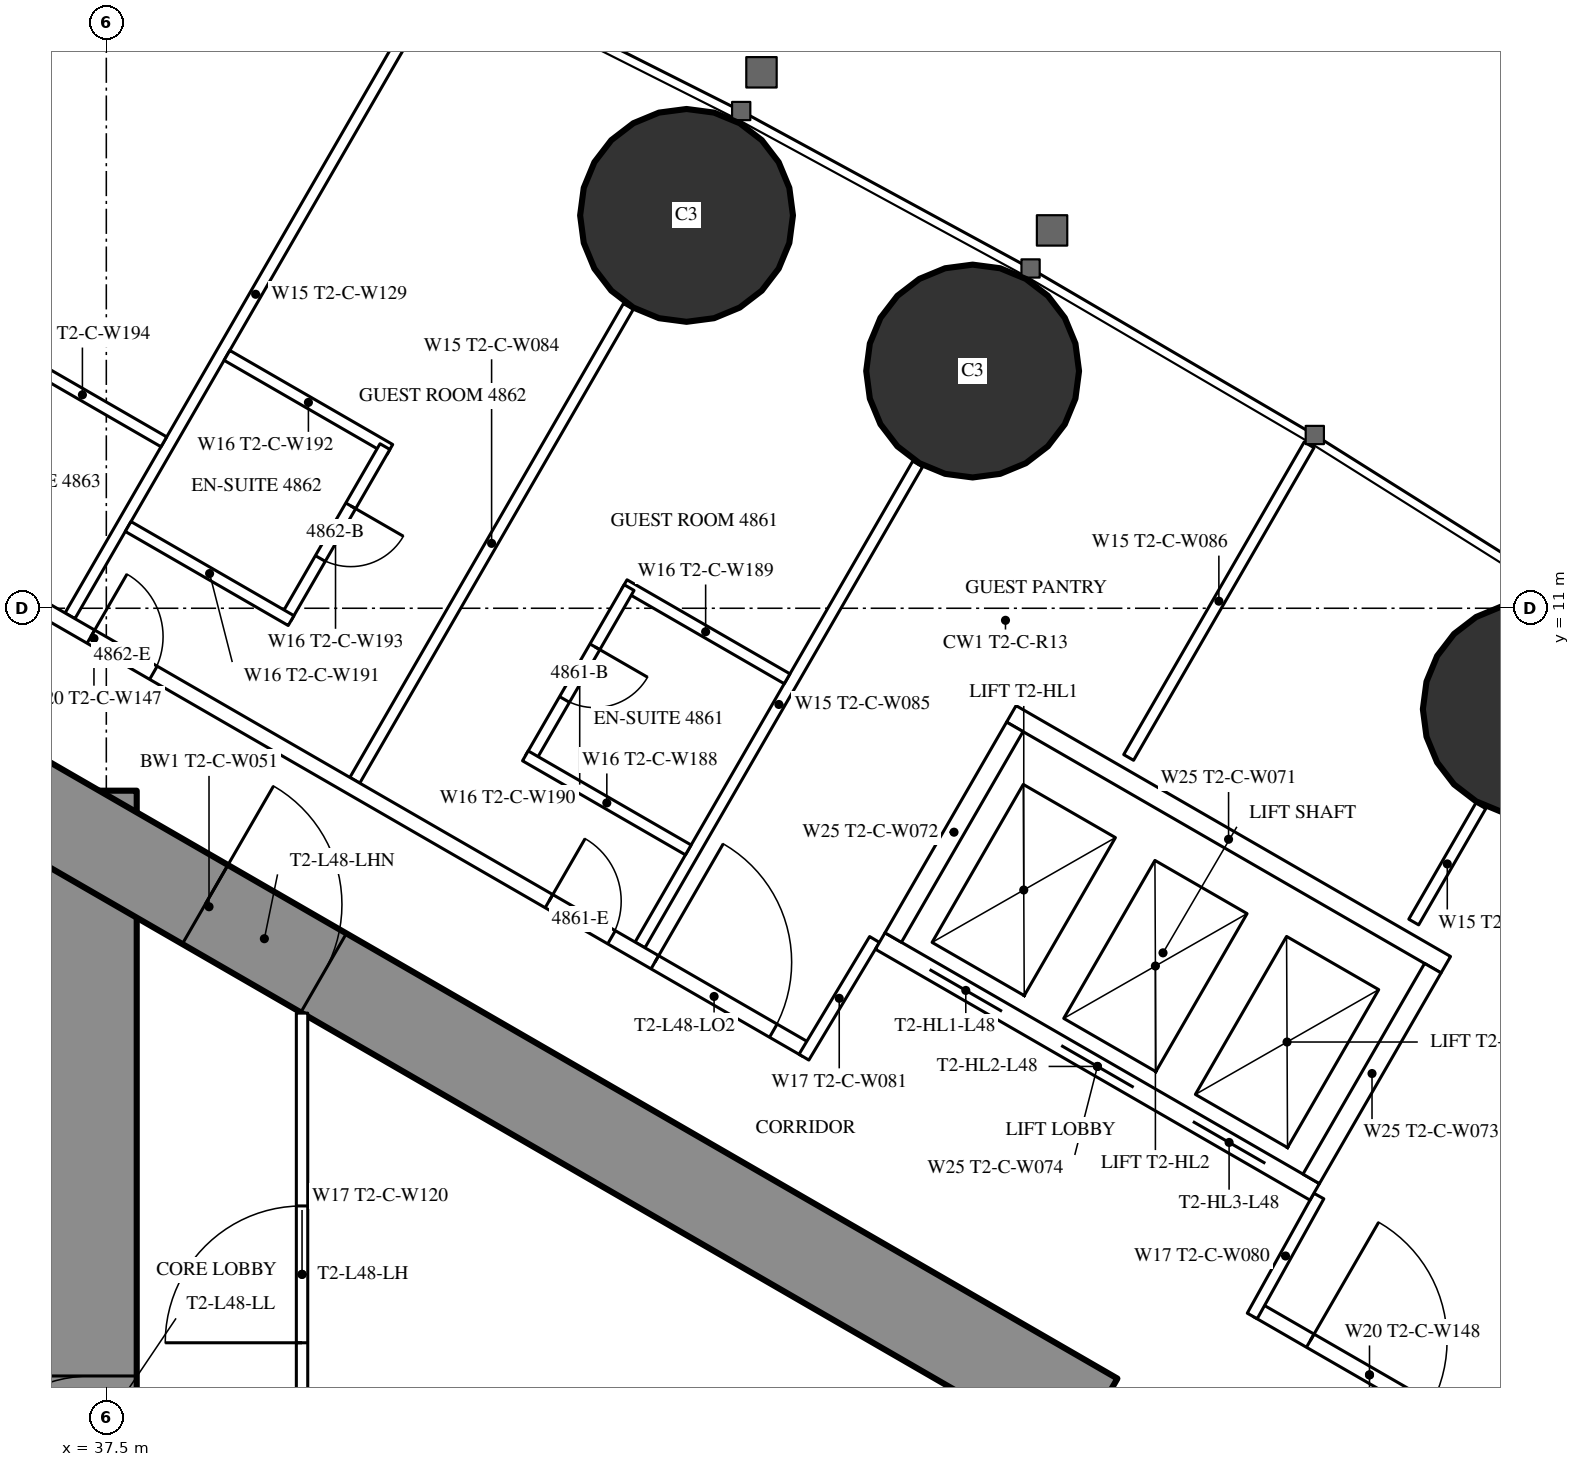
"""IFC4 building model, lengths in metres.
Left out: names, types, materials, properties, quantities, classifications, styles, units other than length and angle.
Written with IfcOpenShell. Run it as: python <this file> out.ifc"""

import sys

from ifc_helpers import new_model, si_unit, direction, frame, frame_2d, origin, origin_2d, place, context, subcontext, project, spatial, rectangle, circle, extrude, element, fill, save


model = new_model("IFC4")
c1 = context("Model", 3, precision=1e-05, world=origin(), true_north=direction((0.0, 1.0)))
c2 = subcontext(c1, "Body", "Model", "MODEL_VIEW")
j1 = project(units=[si_unit("LENGTHUNIT", "METRE"), si_unit("PLANEANGLEUNIT", "RADIAN")], contexts=[c1])
p1 = place(None, origin())
s1 = spatial("IfcSite", under=j1, at=p1, CompositionType="ELEMENT")
p2 = place(p1, origin())
s2 = spatial("IfcBuilding", under=s1, at=p2, CompositionType="ELEMENT")
p3 = place(p2, frame((0.0, 0.0, 180.8)))
s3 = spatial("IfcBuildingStorey", under=s2, at=p3, CompositionType="ELEMENT", Elevation=180.8)
for number, where, z_axis, x_axis in (
    (1, (56.221, 9.672, 0.0), (0.0, 0.0, 1.0), (1.0, 0.0, 0.0)),
    (2, (48.897, 14.121, 0.0), (0.0, 0.0, 1.0), (1.0, 0.0, 0.0)),
    (3, (45.134, 16.168, 0.0), (0.0, 0.0, 1.0), (1.0, 0.0, 0.0)),
):
    element("IfcColumn", number, at=place(p3, frame(where, z_axis=z_axis, x_axis=x_axis)), inside=s3, PredefinedType="COLUMN", context=c2, shape_type="SweptSolid", body=[
        extrude(circle(Radius=1.4, at=origin_2d()), origin(), (0.0, 0.0, 1.0), 3.5),
    ])
p4 = place(p3, frame((37.3, -8.6, 0.0), z_axis=(0.0, 0.0, 1.0), x_axis=(0.0, 1.0, 0.0)))
e4 = element("IfcWall", 4, at=p4, inside=s3, PredefinedType="SHEAR", context=c2, shape_type="SweptSolid", body=[
    extrude(rectangle(XDim=17.2, YDim=1.2, at=frame_2d((8.6, 0.0))), origin(), (0.0, 0.0, 1.0), 3.5),
])
p5 = place(p4, frame((7.7, 0.0, 0.0)))
e5 = element("IfcOpeningElement", 5, at=p5, cuts=e4, PredefinedType="OPENING", context=c2, shape_type="SweptSolid", body=[
    extrude(rectangle(XDim=1.8, YDim=2.2, at=frame_2d((0.9, 1.1))), frame((0.0, 0.61, 0.0), z_axis=(0.0, -1.0, 0.0), x_axis=(1.0, 0.0, 0.0)), (0.0, 0.0, 1.0), 1.22),
])
p6 = place(p3, frame((27.2, 13.8, 0.0), z_axis=(0.0, 0.0, 1.0), x_axis=(0.866024515034, -0.500001539357, 0.0)))
e6 = element("IfcWall", 6, at=p6, inside=s3, PredefinedType="SHEAR", context=c2, shape_type="SweptSolid", body=[
    extrude(rectangle(XDim=26.907, YDim=1.2, at=frame_2d((13.454, 0.0))), origin(), (0.0, 0.0, 1.0), 3.5),
])
p7 = place(p6, frame((4.6, 0.0, 0.0)))
e7 = element("IfcOpeningElement", 7, at=p7, cuts=e6, PredefinedType="OPENING", context=c2, shape_type="SweptSolid", body=[
    extrude(rectangle(XDim=1.0, YDim=2.2, at=frame_2d((0.5, 1.1))), frame((0.0, 0.61, 0.0), z_axis=(0.0, -1.0, 0.0), x_axis=(1.0, 0.0, 0.0)), (0.0, 0.0, 1.0), 1.22),
])
p8 = place(p6, frame((13.395, 0.0, 0.0)))
e8 = element("IfcOpeningElement", 8, at=p8, cuts=e6, PredefinedType="OPENING", context=c2, shape_type="SweptSolid", body=[
    extrude(rectangle(XDim=1.8, YDim=2.2, at=frame_2d((0.9, 1.1))), frame((0.0, 0.61, 0.0), z_axis=(0.0, -1.0, 0.0), x_axis=(1.0, 0.0, 0.0)), (0.0, 0.0, 1.0), 1.22),
])
p9 = place(p3, frame((37.022, 10.9, 0.0), z_axis=(0.0, 0.0, 1.0), x_axis=(0.499998620953, 0.866026199976, 0.0)))
e9 = element("IfcWall", 9, at=p9, inside=s3, PredefinedType="PARTITIONING", context=c2, shape_type="SweptSolid", body=[
    extrude(rectangle(XDim=9.77, YDim=0.15, at=frame_2d((4.885, 0.0))), origin(), (0.0, 0.0, 1.0), 3.25),
])
p10 = place(p3, frame((40.769, 8.737, 0.0), z_axis=(0.0, 0.0, 1.0), x_axis=(0.500013115284, 0.866017831539, 0.0)))
e10 = element("IfcWall", 10, at=p10, inside=s3, PredefinedType="PARTITIONING", context=c2, shape_type="SweptSolid", body=[
    extrude(rectangle(XDim=7.198, YDim=0.15, at=frame_2d((3.599, 0.0))), origin(), (0.0, 0.0, 1.0), 2.3),
])
p11 = place(p3, frame((44.521, 6.571, 0.0), z_axis=(0.0, 0.0, 1.0), x_axis=(0.500020376429, 0.866013639128, 0.0)))
e11 = element("IfcWall", 11, at=p11, inside=s3, PredefinedType="PARTITIONING", context=c2, shape_type="SweptSolid", body=[
    extrude(rectangle(XDim=7.306, YDim=0.15, at=frame_2d((3.653, 0.0))), origin(), (0.0, 0.0, 1.0), 2.3),
])
p12 = place(p3, frame((50.95, 9.037, 0.0), z_axis=(0.0, 0.0, 1.0), x_axis=(0.499988022762, 0.866032318735, 0.0)))
e12 = element("IfcWall", 12, at=p12, inside=s3, PredefinedType="PARTITIONING", context=c2, shape_type="SweptSolid", body=[
    extrude(rectangle(XDim=4.748, YDim=0.15, at=frame_2d((2.374, 0.0))), origin(), (0.0, 0.0, 1.0), 3.25),
])
p13 = place(p3, frame((54.7, 6.872, 0.0), z_axis=(0.0, 0.0, 1.0), x_axis=(0.499989690894, 0.866031355668, 0.0)))
e13 = element("IfcWall", 13, at=p13, inside=s3, PredefinedType="PARTITIONING", context=c2, shape_type="SweptSolid", body=[
    extrude(rectangle(XDim=1.766, YDim=0.15, at=frame_2d((0.883, 0.0))), origin(), (0.0, 0.0, 1.0), 3.25),
])
p14 = place(p3, frame((27.959, 16.017, 0.0), z_axis=(0.0, 0.0, 1.0), x_axis=(0.866027146794, -0.499996981007, 0.0)))
e14 = element("IfcWall", 14, at=p14, inside=s3, PredefinedType="PARTITIONING", context=c2, shape_type="SweptSolid", body=[
    extrude(rectangle(XDim=21.657, YDim=0.2, at=frame_2d((10.829, 0.0))), origin(), (0.0, 0.0, 1.0), 3.25),
])
p15 = place(p14, frame((17.741, 0.0, 0.0)))
e15 = element("IfcOpeningElement", 15, at=p15, cuts=e14, PredefinedType="OPENING", context=c2, shape_type="SweptSolid", body=[
    extrude(rectangle(XDim=0.95, YDim=2.2, at=frame_2d((0.475, 1.1))), frame((0.0, 0.11, 0.0), z_axis=(0.0, -1.0, 0.0), x_axis=(1.0, 0.0, 0.0)), (0.0, 0.0, 1.0), 0.22),
])
p16 = place(p14, frame((10.782, 0.0, 0.0)))
e16 = element("IfcOpeningElement", 16, at=p16, cuts=e14, PredefinedType="OPENING", context=c2, shape_type="SweptSolid", body=[
    extrude(rectangle(XDim=0.95, YDim=2.2, at=frame_2d((0.475, 1.1))), frame((0.0, 0.11, 0.0), z_axis=(0.0, -1.0, 0.0), x_axis=(1.0, 0.0, 0.0)), (0.0, 0.0, 1.0), 0.22),
])
p17 = place(p14, frame((6.732, 0.0, 0.0)))
e17 = element("IfcOpeningElement", 17, at=p17, cuts=e14, PredefinedType="OPENING", context=c2, shape_type="SweptSolid", body=[
    extrude(rectangle(XDim=0.95, YDim=2.2, at=frame_2d((0.475, 1.1))), frame((0.0, 0.11, 0.0), z_axis=(0.0, -1.0, 0.0), x_axis=(1.0, 0.0, 0.0)), (0.0, 0.0, 1.0), 0.22),
])
p18 = place(p14, frame((19.349, 0.0, 0.0)))
e18 = element("IfcOpeningElement", 18, at=p18, cuts=e14, PredefinedType="OPENING", context=c2, shape_type="SweptSolid", body=[
    extrude(rectangle(XDim=1.8, YDim=2.2, at=frame_2d((0.9, 1.1))), frame((0.0, 0.11, 0.0), z_axis=(0.0, -1.0, 0.0), x_axis=(1.0, 0.0, 0.0)), (0.0, 0.0, 1.0), 0.22),
])
p19 = place(p3, frame((52.639, 1.769, 0.0), z_axis=(0.0, 0.0, 1.0), x_axis=(0.866027340901, -0.4999966448, 0.0)))
e19 = element("IfcWall", 19, at=p19, inside=s3, PredefinedType="PARTITIONING", context=c2, shape_type="SweptSolid", body=[
    extrude(rectangle(XDim=3.417, YDim=0.2, at=frame_2d((1.708, 0.0))), origin(), (0.0, 0.0, 1.0), 3.25),
])
p20 = place(p19, frame((0.809, 0.0, 0.0)))
e20 = element("IfcOpeningElement", 20, at=p20, cuts=e19, PredefinedType="OPENING", context=c2, shape_type="SweptSolid", body=[
    extrude(rectangle(XDim=1.8, YDim=2.2, at=frame_2d((0.9, 1.1))), frame((0.0, 0.11, 0.0), z_axis=(0.0, -1.0, 0.0), x_axis=(1.0, 0.0, 0.0)), (0.0, 0.0, 1.0), 0.22),
])
for number, where, z_axis, x_axis in (
    (21, (52.576, 1.689, 0.0), (0.0, 0.0, 1.0), (0.485, 0.874, 0.0)),
    (22, (47.606, 6.643, 0.0), (0.0, 0.0, 1.0), (-0.514, -0.858, 0.0)),
):
    element("IfcWall", number, at=place(p3, frame(where, z_axis=z_axis, x_axis=x_axis)), inside=s3, PredefinedType="PARTITIONING", context=c2, shape_type="SweptSolid", body=[
        extrude(rectangle(XDim=1.805, YDim=0.15, at=frame_2d((0.902, 0.0))), origin(), (0.0, 0.0, 1.0), 3.25),
    ])
p21 = place(p3, frame((44.313, 11.31, 0.0), z_axis=(0.0, 0.0, 1.0), x_axis=(0.866031185235, -0.4999899861, 0.0)))
e23 = element("IfcWall", 23, at=p21, inside=s3, PredefinedType="PARTITIONING", context=c2, shape_type="SweptSolid", body=[
    extrude(rectangle(XDim=2.475, YDim=0.15, at=frame_2d((1.238, 0.0))), origin(), (0.0, 0.0, 1.0), 3.25),
])
p22 = place(p3, frame((43.078, 9.021, 0.0), z_axis=(0.0, 0.0, 1.0), x_axis=(0.49997716683, 0.86603858612, 0.0)))
e24 = element("IfcWall", 24, at=p22, inside=s3, PredefinedType="PARTITIONING", context=c2, shape_type="SweptSolid", body=[
    extrude(rectangle(XDim=2.6, YDim=0.15, at=frame_2d((1.3, 0.0))), origin(), (0.0, 0.0, 1.0), 3.25),
])
p23 = place(p22, frame((0.9, 0.0, 0.0)))
e25 = element("IfcOpeningElement", 25, at=p23, cuts=e24, PredefinedType="OPENING", context=c2, shape_type="SweptSolid", body=[
    extrude(rectangle(XDim=0.8, YDim=2.2, at=frame_2d((0.4, 1.1))), frame((0.0, 0.085, 0.0), z_axis=(0.0, -1.0, 0.0), x_axis=(1.0, 0.0, 0.0)), (0.0, 0.0, 1.0), 0.17),
])
p24 = place(p3, frame((43.013, 9.058, 0.0), z_axis=(0.0, 0.0, 1.0), x_axis=(0.866006523861, -0.500032699561, 0.0)))
e26 = element("IfcWall", 26, at=p24, inside=s3, PredefinedType="PARTITIONING", context=c2, shape_type="SweptSolid", body=[
    extrude(rectangle(XDim=2.475, YDim=0.15, at=frame_2d((1.237, 0.0))), origin(), (0.0, 0.0, 1.0), 2.45),
])
p25 = place(p3, frame((39.087, 14.327, 0.0), z_axis=(0.0, 0.0, 1.0), x_axis=(0.866006523861, -0.500032699561, 0.0)))
e27 = element("IfcWall", 27, at=p25, inside=s3, PredefinedType="PARTITIONING", context=c2, shape_type="SweptSolid", body=[
    extrude(rectangle(XDim=2.475, YDim=0.15, at=frame_2d((1.237, 0.0))), origin(), (0.0, 0.0, 1.0), 3.25),
])
p26 = place(p3, frame((39.865, 10.875, 0.0), z_axis=(0.0, 0.0, 1.0), x_axis=(0.500047596559, 0.865997922154, 0.0)))
e28 = element("IfcWall", 28, at=p26, inside=s3, PredefinedType="PARTITIONING", context=c2, shape_type="SweptSolid", body=[
    extrude(rectangle(XDim=2.6, YDim=0.15, at=frame_2d((1.3, 0.0))), origin(), (0.0, 0.0, 1.0), 3.25),
])
p27 = place(p26, frame((0.9, 0.0, 0.0)))
e29 = element("IfcOpeningElement", 29, at=p27, cuts=e28, PredefinedType="OPENING", context=c2, shape_type="SweptSolid", body=[
    extrude(rectangle(XDim=0.8, YDim=2.2, at=frame_2d((0.4, 1.1))), frame((0.0, 0.085, 0.0), z_axis=(0.0, -1.0, 0.0), x_axis=(1.0, 0.0, 0.0)), (0.0, 0.0, 1.0), 0.17),
])
for number, where, z_axis, x_axis in (
    (30, (37.787, 12.075, 0.0), (0.0, 0.0, 1.0), (0.866, -0.5, 0.0)),
    (31, (36.114, 14.427, 0.0), (0.0, 0.0, 1.0), (0.866, -0.5, 0.0)),
):
    element("IfcWall", number, at=place(p3, frame(where, z_axis=z_axis, x_axis=x_axis)), inside=s3, PredefinedType="PARTITIONING", context=c2, shape_type="SweptSolid", body=[
        extrude(rectangle(XDim=2.475, YDim=0.15, at=frame_2d((1.237, 0.0))), origin(), (0.0, 0.0, 1.0), 3.25),
    ])
p28 = place(p3, frame((40.075, -1.2, 0.0), z_axis=(0.0, 0.0, 1.0), x_axis=(0.0, 1.0, 0.0)))
e32 = element("IfcWall", 32, at=p28, inside=s3, PredefinedType="PARTITIONING", context=c2, shape_type="SweptSolid", body=[
    extrude(rectangle(XDim=6.874, YDim=0.15, at=frame_2d((3.437, 0.0))), origin(), (0.0, 0.0, 1.0), 3.25),
])
p29 = place(p28, frame((2.537, 0.0, 0.0)))
e33 = element("IfcOpeningElement", 33, at=p29, cuts=e32, PredefinedType="OPENING", context=c2, shape_type="SweptSolid", body=[
    extrude(rectangle(XDim=1.8, YDim=2.2, at=frame_2d((0.9, 1.1))), frame((0.0, 0.085, 0.0), z_axis=(0.0, -1.0, 0.0), x_axis=(1.0, 0.0, 0.0)), (0.0, 0.0, 1.0), 0.17),
])
p30 = place(p3, frame((47.681, 6.622, 0.0), z_axis=(0.0, 0.0, 1.0), x_axis=(0.86603344179, -0.499986077507, 0.0)))
e34 = element("IfcWall", 34, at=p30, inside=s3, PredefinedType="PARTITIONING", context=c2, shape_type="SweptSolid", body=[
    extrude(rectangle(XDim=6.6, YDim=0.25, at=frame_2d((3.3, 0.0))), origin(), (0.0, 0.0, 1.0), 3.25),
])
p31 = place(p30, frame((0.75, 0.0, 0.0)))
e35 = element("IfcOpeningElement", 35, at=p31, cuts=e34, PredefinedType="OPENING", context=c2, shape_type="SweptSolid", body=[
    extrude(rectangle(XDim=1.1, YDim=2.2, at=frame_2d((0.55, 1.1))), frame((0.0, 0.135, 0.0), z_axis=(0.0, -1.0, 0.0), x_axis=(1.0, 0.0, 0.0)), (0.0, 0.0, 1.0), 0.27),
])
p32 = place(p30, frame((2.75, 0.0, 0.0)))
e36 = element("IfcOpeningElement", 36, at=p32, cuts=e34, PredefinedType="OPENING", context=c2, shape_type="SweptSolid", body=[
    extrude(rectangle(XDim=1.1, YDim=2.2, at=frame_2d((0.55, 1.1))), frame((0.0, 0.135, 0.0), z_axis=(0.0, -1.0, 0.0), x_axis=(1.0, 0.0, 0.0)), (0.0, 0.0, 1.0), 0.27),
])
p33 = place(p30, frame((4.75, 0.0, 0.0)))
e37 = element("IfcOpeningElement", 37, at=p33, cuts=e34, PredefinedType="OPENING", context=c2, shape_type="SweptSolid", body=[
    extrude(rectangle(XDim=1.1, YDim=2.2, at=frame_2d((0.55, 1.1))), frame((0.0, 0.135, 0.0), z_axis=(0.0, -1.0, 0.0), x_axis=(1.0, 0.0, 0.0)), (0.0, 0.0, 1.0), 0.27),
])
p34 = place(p3, frame((49.406, 9.611, 0.0), z_axis=(0.0, 0.0, 1.0), x_axis=(0.86603344179, -0.499986077507, 0.0)))
e38 = element("IfcWall", 38, at=p34, inside=s3, PredefinedType="PARTITIONING", context=c2, shape_type="SweptSolid", body=[
    extrude(rectangle(XDim=6.6, YDim=0.25, at=frame_2d((3.3, 0.0))), origin(), (0.0, 0.0, 1.0), 3.25),
])
p35 = place(p3, frame((47.852, 6.668, 0.0), z_axis=(0.0, 0.0, 1.0), x_axis=(0.499929347863, 0.866066190972, 0.0)))
e39 = element("IfcWall", 39, at=p35, inside=s3, PredefinedType="PARTITIONING", context=c2, shape_type="SweptSolid", body=[
    extrude(rectangle(XDim=3.201, YDim=0.25, at=frame_2d((1.6, 0.0))), origin(), (0.0, 0.0, 1.0), 3.25),
])
p36 = place(p3, frame((53.352, 3.493, 0.0), z_axis=(0.0, 0.0, 1.0), x_axis=(0.499872130319, 0.866099216793, 0.0)))
e40 = element("IfcWall", 40, at=p36, inside=s3, PredefinedType="PARTITIONING", context=c2, shape_type="SweptSolid", body=[
    extrude(rectangle(XDim=3.2, YDim=0.25, at=frame_2d((1.6, 0.0))), origin(), (0.0, 0.0, 1.0), 3.25),
])
p37 = place(p23, origin())
e41 = element("IfcDoor", 41, at=p37, inside=s3, OperationType="SINGLE_SWING_RIGHT", PredefinedType="DOOR", context=c2, shape_type="SweptSolid", body=[
    extrude(rectangle(XDim=0.8, YDim=2.2, at=frame_2d((0.4, 1.1))), frame((0.0, 0.025, 0.0), z_axis=(0.0, -1.0, 0.0), x_axis=(1.0, 0.0, 0.0)), (0.0, 0.0, 1.0), 0.05),
])
fill(e25, e41)
p38 = place(p15, origin())
e42 = element("IfcDoor", 42, at=p38, inside=s3, OperationType="SINGLE_SWING_LEFT", PredefinedType="DOOR", context=c2, shape_type="SweptSolid", body=[
    extrude(rectangle(XDim=0.95, YDim=2.2, at=frame_2d((0.475, 1.1))), frame((0.0, 0.025, 0.0), z_axis=(0.0, -1.0, 0.0), x_axis=(1.0, 0.0, 0.0)), (0.0, 0.0, 1.0), 0.05),
])
fill(e15, e42)
p39 = place(p27, origin())
e43 = element("IfcDoor", 43, at=p39, inside=s3, OperationType="SINGLE_SWING_RIGHT", PredefinedType="DOOR", context=c2, shape_type="SweptSolid", body=[
    extrude(rectangle(XDim=0.8, YDim=2.2, at=frame_2d((0.4, 1.1))), frame((0.0, 0.025, 0.0), z_axis=(0.0, -1.0, 0.0), x_axis=(1.0, 0.0, 0.0)), (0.0, 0.0, 1.0), 0.05),
])
fill(e29, e43)
p40 = place(p16, origin())
e44 = element("IfcDoor", 44, at=p40, inside=s3, OperationType="SINGLE_SWING_LEFT", PredefinedType="DOOR", context=c2, shape_type="SweptSolid", body=[
    extrude(rectangle(XDim=0.95, YDim=2.2, at=frame_2d((0.475, 1.1))), frame((0.0, 0.025, 0.0), z_axis=(0.0, -1.0, 0.0), x_axis=(1.0, 0.0, 0.0)), (0.0, 0.0, 1.0), 0.05),
])
fill(e16, e44)
p41 = place(p20, origin())
e45 = element("IfcDoor", 45, at=p41, inside=s3, OperationType="DOUBLE_DOOR_SINGLE_SWING", PredefinedType="DOOR", context=c2, shape_type="SweptSolid", body=[
    extrude(rectangle(XDim=1.8, YDim=2.2, at=frame_2d((0.9, 1.1))), frame((0.0, 0.025, 0.0), z_axis=(0.0, -1.0, 0.0), x_axis=(1.0, 0.0, 0.0)), (0.0, 0.0, 1.0), 0.05),
])
fill(e20, e45)
p42 = place(p18, origin())
e46 = element("IfcDoor", 46, at=p42, inside=s3, OperationType="DOUBLE_DOOR_SINGLE_SWING", PredefinedType="DOOR", context=c2, shape_type="SweptSolid", body=[
    extrude(rectangle(XDim=1.8, YDim=2.2, at=frame_2d((0.9, 1.1))), frame((0.0, 0.025, 0.0), z_axis=(0.0, -1.0, 0.0), x_axis=(1.0, 0.0, 0.0)), (0.0, 0.0, 1.0), 0.05),
])
fill(e18, e46)
p43 = place(p29, origin())
e47 = element("IfcDoor", 47, at=p43, inside=s3, OperationType="DOUBLE_DOOR_SINGLE_SWING", PredefinedType="DOOR", context=c2, shape_type="SweptSolid", body=[
    extrude(rectangle(XDim=1.8, YDim=2.2, at=frame_2d((0.9, 1.1))), frame((0.0, 0.025, 0.0), z_axis=(0.0, -1.0, 0.0), x_axis=(1.0, 0.0, 0.0)), (0.0, 0.0, 1.0), 0.05),
])
fill(e33, e47)
p44 = place(p8, origin())
e48 = element("IfcDoor", 48, at=p44, inside=s3, OperationType="DOUBLE_DOOR_SINGLE_SWING", PredefinedType="DOOR", context=c2, shape_type="SweptSolid", body=[
    extrude(rectangle(XDim=1.8, YDim=2.2, at=frame_2d((0.9, 1.1))), frame((0.0, 0.025, 0.0), z_axis=(0.0, -1.0, 0.0), x_axis=(1.0, 0.0, 0.0)), (0.0, 0.0, 1.0), 0.05),
])
fill(e8, e48)
p45 = place(p5, origin())
e49 = element("IfcDoor", 49, at=p45, inside=s3, OperationType="DOUBLE_DOOR_SINGLE_SWING", PredefinedType="DOOR", context=c2, shape_type="SweptSolid", body=[
    extrude(rectangle(XDim=1.8, YDim=2.2, at=frame_2d((0.9, 1.1))), frame((0.0, 0.025, 0.0), z_axis=(0.0, -1.0, 0.0), x_axis=(1.0, 0.0, 0.0)), (0.0, 0.0, 1.0), 0.05),
])
fill(e5, e49)
p46 = place(p31, origin())
e50 = element("IfcDoor", 50, at=p46, inside=s3, OperationType="DOUBLE_DOOR_SLIDING", PredefinedType="USERDEFINED", context=c2, shape_type="SweptSolid", body=[
    extrude(rectangle(XDim=1.1, YDim=2.2, at=frame_2d((0.55, 1.1))), frame((0.0, 0.025, 0.0), z_axis=(0.0, -1.0, 0.0), x_axis=(1.0, 0.0, 0.0)), (0.0, 0.0, 1.0), 0.05),
])
fill(e35, e50)
p47 = place(p32, origin())
e51 = element("IfcDoor", 51, at=p47, inside=s3, OperationType="DOUBLE_DOOR_SLIDING", PredefinedType="USERDEFINED", context=c2, shape_type="SweptSolid", body=[
    extrude(rectangle(XDim=1.1, YDim=2.2, at=frame_2d((0.55, 1.1))), frame((0.0, 0.025, 0.0), z_axis=(0.0, -1.0, 0.0), x_axis=(1.0, 0.0, 0.0)), (0.0, 0.0, 1.0), 0.05),
])
fill(e36, e51)
p48 = place(p33, origin())
e52 = element("IfcDoor", 52, at=p48, inside=s3, OperationType="DOUBLE_DOOR_SLIDING", PredefinedType="USERDEFINED", context=c2, shape_type="SweptSolid", body=[
    extrude(rectangle(XDim=1.1, YDim=2.2, at=frame_2d((0.55, 1.1))), frame((0.0, 0.025, 0.0), z_axis=(0.0, -1.0, 0.0), x_axis=(1.0, 0.0, 0.0)), (0.0, 0.0, 1.0), 0.05),
])
fill(e37, e52)
save(model, sys.argv[1])
